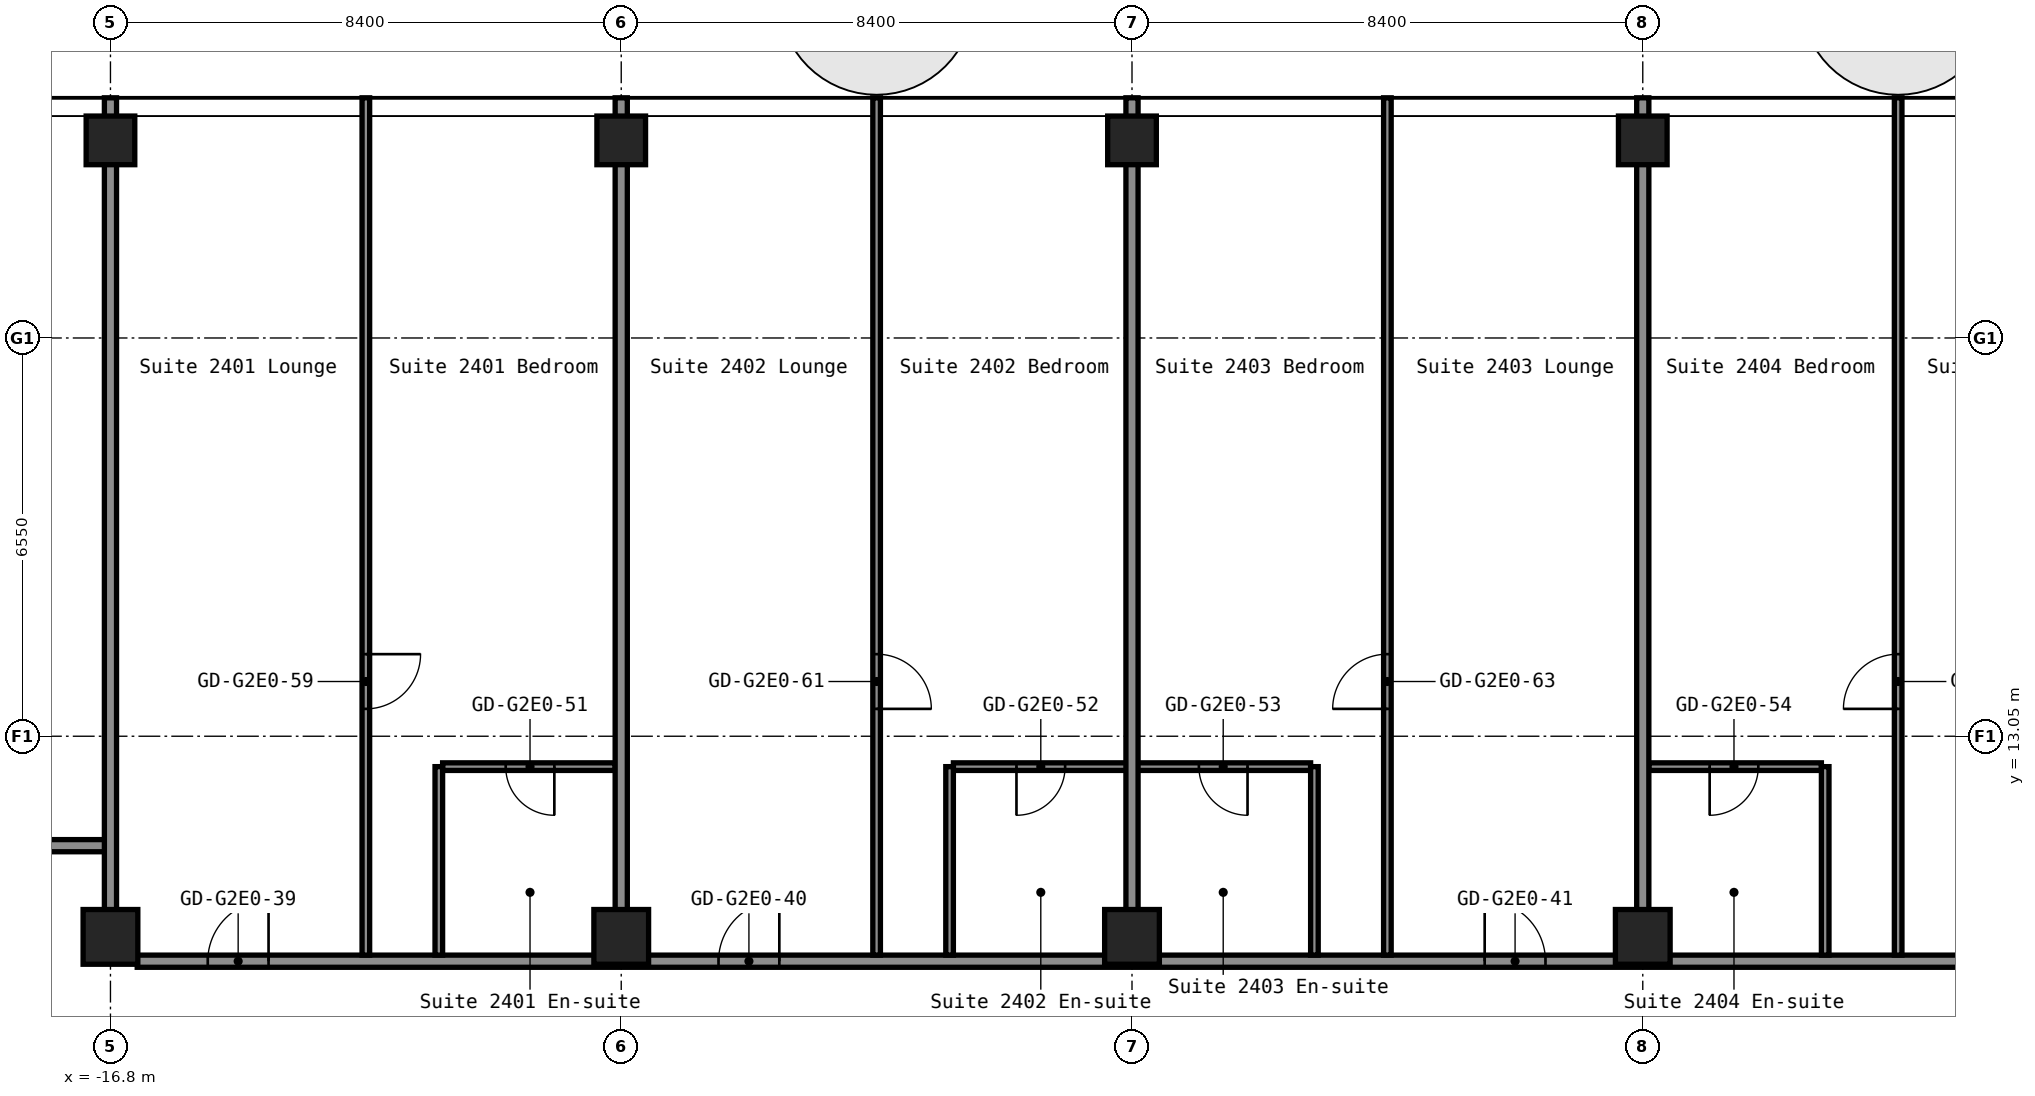
"""IFC4 building model, lengths in metres.
Left out: names, types, materials, properties, quantities, classifications, styles, units other than length and angle.
Written with IfcOpenShell. Run it as: python <this file> out.ifc"""

import sys

from ifc_helpers import new_model, si_unit, direction, frame, frame_2d, origin, origin_2d, place, context, subcontext, project, spatial, rectangle, hollow_rectangle, extrude, element, fill, save


model = new_model("IFC4")
c1 = context("Model", 3, precision=1e-05, world=origin(), true_north=direction((0.0, 1.0)))
c2 = subcontext(c1, "Body", "Model", "MODEL_VIEW")
j1 = project(units=[si_unit("LENGTHUNIT", "METRE"), si_unit("PLANEANGLEUNIT", "RADIAN")], contexts=[c1])
p1 = place(None, origin())
s1 = spatial("IfcSite", under=j1, at=p1, CompositionType="ELEMENT")
p2 = place(p1, origin())
s2 = spatial("IfcBuilding", under=s1, at=p2, CompositionType="ELEMENT")
p3 = place(p2, frame((0.0, 0.0, 88.2)))
s3 = spatial("IfcBuildingStorey", under=s2, at=p3, CompositionType="ELEMENT", Elevation=88.2)
p4 = place(p3, frame((-16.8, 9.75, 0.0), z_axis=(0.0, 0.0, 1.0), x_axis=(1.0, 0.0, 0.0)))
e1 = element("IfcColumn", 1, at=p4, inside=s3, PredefinedType="COLUMN", context=c2, shape_type="SweptSolid", body=[
    extrude(hollow_rectangle(XDim=0.9, YDim=0.9, WallThickness=0.036, at=origin_2d()), origin(), (0.0, 0.0, 1.0), 2.8),
])
p5 = place(p3, frame((-16.8, 22.85, 0.0), z_axis=(0.0, 0.0, 1.0), x_axis=(1.0, 0.0, 0.0)))
e2 = element("IfcColumn", 2, at=p5, inside=s3, PredefinedType="COLUMN", context=c2, shape_type="SweptSolid", body=[
    extrude(hollow_rectangle(XDim=0.8, YDim=0.8, WallThickness=0.032, at=origin_2d()), origin(), (0.0, 0.0, 1.0), 2.8),
])
p6 = place(p3, frame((-8.4, 9.75, 0.0), z_axis=(0.0, 0.0, 1.0), x_axis=(1.0, 0.0, 0.0)))
e3 = element("IfcColumn", 3, at=p6, inside=s3, PredefinedType="COLUMN", context=c2, shape_type="SweptSolid", body=[
    extrude(hollow_rectangle(XDim=0.9, YDim=0.9, WallThickness=0.036, at=origin_2d()), origin(), (0.0, 0.0, 1.0), 2.8),
])
p7 = place(p3, frame((-8.4, 22.85, 0.0), z_axis=(0.0, 0.0, 1.0), x_axis=(1.0, 0.0, 0.0)))
e4 = element("IfcColumn", 4, at=p7, inside=s3, PredefinedType="COLUMN", context=c2, shape_type="SweptSolid", body=[
    extrude(hollow_rectangle(XDim=0.8, YDim=0.8, WallThickness=0.032, at=origin_2d()), origin(), (0.0, 0.0, 1.0), 2.8),
])
p8 = place(p3, frame((0.0, 9.75, 0.0), z_axis=(0.0, 0.0, 1.0), x_axis=(1.0, 0.0, 0.0)))
e5 = element("IfcColumn", 5, at=p8, inside=s3, PredefinedType="COLUMN", context=c2, shape_type="SweptSolid", body=[
    extrude(hollow_rectangle(XDim=0.9, YDim=0.9, WallThickness=0.036, at=origin_2d()), origin(), (0.0, 0.0, 1.0), 2.8),
])
p9 = place(p3, frame((0.0, 22.85, 0.0), z_axis=(0.0, 0.0, 1.0), x_axis=(1.0, 0.0, 0.0)))
e6 = element("IfcColumn", 6, at=p9, inside=s3, PredefinedType="COLUMN", context=c2, shape_type="SweptSolid", body=[
    extrude(hollow_rectangle(XDim=0.8, YDim=0.8, WallThickness=0.032, at=origin_2d()), origin(), (0.0, 0.0, 1.0), 2.8),
])
p10 = place(p3, frame((8.4, 9.75, 0.0), z_axis=(0.0, 0.0, 1.0), x_axis=(1.0, 0.0, 0.0)))
e7 = element("IfcColumn", 7, at=p10, inside=s3, PredefinedType="COLUMN", context=c2, shape_type="SweptSolid", body=[
    extrude(hollow_rectangle(XDim=0.9, YDim=0.9, WallThickness=0.036, at=origin_2d()), origin(), (0.0, 0.0, 1.0), 2.8),
])
p11 = place(p3, frame((8.4, 22.85, 0.0), z_axis=(0.0, 0.0, 1.0), x_axis=(1.0, 0.0, 0.0)))
e8 = element("IfcColumn", 8, at=p11, inside=s3, PredefinedType="COLUMN", context=c2, shape_type="SweptSolid", body=[
    extrude(hollow_rectangle(XDim=0.8, YDim=0.8, WallThickness=0.032, at=origin_2d()), origin(), (0.0, 0.0, 1.0), 2.8),
])
p12 = place(p3, frame((-16.36, 9.35, 0.0), z_axis=(0.0, 0.0, 1.0), x_axis=(1.0, 0.0, 0.0)))
e9 = element("IfcWall", 9, at=p12, inside=s3, PredefinedType="PARTITIONING", context=c2, shape_type="SweptSolid", body=[
    extrude(rectangle(XDim=32.72, YDim=0.2, at=frame_2d((16.36, 0.0))), origin(), (0.0, 0.0, 1.0), 2.8),
])
p13 = place(p12, frame((1.16, 0.0, 0.0)))
e10 = element("IfcOpeningElement", 10, at=p13, cuts=e9, PredefinedType="OPENING", context=c2, shape_type="SweptSolid", body=[
    extrude(rectangle(XDim=1.0, YDim=2.1, at=frame_2d((0.5, 1.05))), frame((0.0, 0.11, 0.0), z_axis=(0.0, -1.0, 0.0), x_axis=(1.0, 0.0, 0.0)), (0.0, 0.0, 1.0), 0.22),
])
p14 = place(p12, frame((9.56, 0.0, 0.0)))
e11 = element("IfcOpeningElement", 11, at=p14, cuts=e9, PredefinedType="OPENING", context=c2, shape_type="SweptSolid", body=[
    extrude(rectangle(XDim=1.0, YDim=2.1, at=frame_2d((0.5, 1.05))), frame((0.0, 0.11, 0.0), z_axis=(0.0, -1.0, 0.0), x_axis=(1.0, 0.0, 0.0)), (0.0, 0.0, 1.0), 0.22),
])
p15 = place(p12, frame((22.16, 0.0, 0.0)))
e12 = element("IfcOpeningElement", 12, at=p15, cuts=e9, PredefinedType="OPENING", context=c2, shape_type="SweptSolid", body=[
    extrude(rectangle(XDim=1.0, YDim=2.1, at=frame_2d((0.5, 1.05))), frame((0.0, 0.11, 0.0), z_axis=(0.0, -1.0, 0.0), x_axis=(1.0, 0.0, 0.0)), (0.0, 0.0, 1.0), 0.22),
])
p16 = place(p12, frame((30.56, 0.0, 0.0)))
e13 = element("IfcOpeningElement", 13, at=p16, cuts=e9, PredefinedType="OPENING", context=c2, shape_type="SweptSolid", body=[
    extrude(rectangle(XDim=1.0, YDim=2.1, at=frame_2d((0.5, 1.05))), frame((0.0, 0.11, 0.0), z_axis=(0.0, -1.0, 0.0), x_axis=(1.0, 0.0, 0.0)), (0.0, 0.0, 1.0), 0.22),
])
p17 = place(p3, frame((-46.5, 11.25, 0.0), z_axis=(0.0, 0.0, 1.0), x_axis=(1.0, 0.0, 0.0)))
e14 = element("IfcWall", 14, at=p17, inside=s3, PredefinedType="PARTITIONING", context=c2, shape_type="SweptSolid", body=[
    extrude(rectangle(XDim=29.7, YDim=0.2, at=frame_2d((14.85, 0.0))), origin(), (0.0, 0.0, 1.0), 2.8),
])
p18 = place(p17, frame((1.95, 0.0, 0.0)))
e15 = element("IfcOpeningElement", 15, at=p18, cuts=e14, PredefinedType="OPENING", context=c2, shape_type="SweptSolid", body=[
    extrude(rectangle(XDim=0.9, YDim=2.1, at=frame_2d((0.45, 1.05))), frame((0.0, 0.11, 0.0), z_axis=(0.0, -1.0, 0.0), x_axis=(1.0, 0.0, 0.0)), (0.0, 0.0, 1.0), 0.22),
])
p19 = place(p17, frame((8.2, 0.0, 0.0)))
e16 = element("IfcOpeningElement", 16, at=p19, cuts=e14, PredefinedType="OPENING", context=c2, shape_type="SweptSolid", body=[
    extrude(rectangle(XDim=1.0, YDim=2.1, at=frame_2d((0.5, 1.05))), frame((0.0, 0.11, 0.0), z_axis=(0.0, -1.0, 0.0), x_axis=(1.0, 0.0, 0.0)), (0.0, 0.0, 1.0), 0.22),
])
p20 = place(p17, frame((16.6, 0.0, 0.0)))
e17 = element("IfcOpeningElement", 17, at=p20, cuts=e14, PredefinedType="OPENING", context=c2, shape_type="SweptSolid", body=[
    extrude(rectangle(XDim=1.0, YDim=2.1, at=frame_2d((0.5, 1.05))), frame((0.0, 0.11, 0.0), z_axis=(0.0, -1.0, 0.0), x_axis=(1.0, 0.0, 0.0)), (0.0, 0.0, 1.0), 0.22),
])
p21 = place(p17, frame((25.0, 0.0, 0.0)))
e18 = element("IfcOpeningElement", 18, at=p21, cuts=e14, PredefinedType="OPENING", context=c2, shape_type="SweptSolid", body=[
    extrude(rectangle(XDim=1.0, YDim=2.1, at=frame_2d((0.5, 1.05))), frame((0.0, 0.11, 0.0), z_axis=(0.0, -1.0, 0.0), x_axis=(1.0, 0.0, 0.0)), (0.0, 0.0, 1.0), 0.22),
])
p22 = place(p3, frame((-11.337, 12.55, 0.0), z_axis=(0.0, 0.0, 1.0), x_axis=(1.0, 0.0, 0.0)))
e19 = element("IfcWall", 19, at=p22, inside=s3, PredefinedType="PARTITIONING", context=c2, shape_type="SweptSolid", body=[
    extrude(rectangle(XDim=2.837, YDim=0.125, at=frame_2d((1.419, 0.0))), origin(), (0.0, 0.0, 1.0), 2.8),
])
p23 = place(p22, frame((1.038, 0.0, 0.0)))
e20 = element("IfcOpeningElement", 20, at=p23, cuts=e19, PredefinedType="OPENING", context=c2, shape_type="SweptSolid", body=[
    extrude(rectangle(XDim=0.8, YDim=2.1, at=frame_2d((0.4, 1.05))), frame((0.0, 0.073, 0.0), z_axis=(0.0, -1.0, 0.0), x_axis=(1.0, 0.0, 0.0)), (0.0, 0.0, 1.0), 0.145),
])
p24 = place(p3, frame((-2.938, 12.55, 0.0), z_axis=(0.0, 0.0, 1.0), x_axis=(1.0, 0.0, 0.0)))
e21 = element("IfcWall", 21, at=p24, inside=s3, PredefinedType="PARTITIONING", context=c2, shape_type="SweptSolid", body=[
    extrude(rectangle(XDim=5.875, YDim=0.125, at=frame_2d((2.938, 0.0))), origin(), (0.0, 0.0, 1.0), 2.8),
])
p25 = place(p24, frame((1.038, 0.0, 0.0)))
e22 = element("IfcOpeningElement", 22, at=p25, cuts=e21, PredefinedType="OPENING", context=c2, shape_type="SweptSolid", body=[
    extrude(rectangle(XDim=0.8, YDim=2.1, at=frame_2d((0.4, 1.05))), frame((0.0, 0.073, 0.0), z_axis=(0.0, -1.0, 0.0), x_axis=(1.0, 0.0, 0.0)), (0.0, 0.0, 1.0), 0.145),
])
p26 = place(p24, frame((4.038, 0.0, 0.0)))
e23 = element("IfcOpeningElement", 23, at=p26, cuts=e21, PredefinedType="OPENING", context=c2, shape_type="SweptSolid", body=[
    extrude(rectangle(XDim=0.8, YDim=2.1, at=frame_2d((0.4, 1.05))), frame((0.0, 0.073, 0.0), z_axis=(0.0, -1.0, 0.0), x_axis=(1.0, 0.0, 0.0)), (0.0, 0.0, 1.0), 0.145),
])
p27 = place(p3, frame((8.5, 12.55, 0.0), z_axis=(0.0, 0.0, 1.0), x_axis=(1.0, 0.0, 0.0)))
e24 = element("IfcWall", 24, at=p27, inside=s3, PredefinedType="PARTITIONING", context=c2, shape_type="SweptSolid", body=[
    extrude(rectangle(XDim=2.837, YDim=0.125, at=frame_2d((1.419, 0.0))), origin(), (0.0, 0.0, 1.0), 2.8),
])
p28 = place(p27, frame((1.0, 0.0, 0.0)))
e25 = element("IfcOpeningElement", 25, at=p28, cuts=e24, PredefinedType="OPENING", context=c2, shape_type="SweptSolid", body=[
    extrude(rectangle(XDim=0.8, YDim=2.1, at=frame_2d((0.4, 1.05))), frame((0.0, 0.073, 0.0), z_axis=(0.0, -1.0, 0.0), x_axis=(1.0, 0.0, 0.0)), (0.0, 0.0, 1.0), 0.145),
])
p29 = place(p3, frame((-16.8, 10.19, 0.0), z_axis=(0.0, 0.0, 1.0), x_axis=(0.0, 1.0, 0.0)))
e26 = element("IfcWall", 26, at=p29, inside=s3, PredefinedType="PARTITIONING", context=c2, shape_type="SweptSolid", body=[
    extrude(rectangle(XDim=13.36, YDim=0.2, at=frame_2d((6.68, 0.0))), origin(), (0.0, 0.0, 1.0), 2.8),
])
p30 = place(p3, frame((-12.6, 9.45, 0.0), z_axis=(0.0, 0.0, 1.0), x_axis=(0.0, 1.0, 0.0)))
e27 = element("IfcWall", 27, at=p30, inside=s3, PredefinedType="PARTITIONING", context=c2, shape_type="SweptSolid", body=[
    extrude(rectangle(XDim=14.1, YDim=0.125, at=frame_2d((7.05, 0.0))), origin(), (0.0, 0.0, 1.0), 2.8),
])
p31 = place(p30, frame((4.05, 0.0, 0.0)))
e28 = element("IfcOpeningElement", 28, at=p31, cuts=e27, PredefinedType="OPENING", context=c2, shape_type="SweptSolid", body=[
    extrude(rectangle(XDim=0.9, YDim=2.1, at=frame_2d((0.45, 1.05))), frame((0.0, 0.073, 0.0), z_axis=(0.0, -1.0, 0.0), x_axis=(1.0, 0.0, 0.0)), (0.0, 0.0, 1.0), 0.145),
])
p32 = place(p3, frame((-11.4, 9.45, 0.0), z_axis=(0.0, 0.0, 1.0), x_axis=(0.0, 1.0, 0.0)))
e29 = element("IfcWall", 29, at=p32, inside=s3, PredefinedType="PARTITIONING", context=c2, shape_type="SweptSolid", body=[
    extrude(rectangle(XDim=3.1, YDim=0.125, at=frame_2d((1.55, 0.0))), origin(), (0.0, 0.0, 1.0), 2.8),
])
p33 = place(p3, frame((-8.4, 10.19, 0.0), z_axis=(0.0, 0.0, 1.0), x_axis=(0.0, 1.0, 0.0)))
e30 = element("IfcWall", 30, at=p33, inside=s3, PredefinedType="PARTITIONING", context=c2, shape_type="SweptSolid", body=[
    extrude(rectangle(XDim=13.36, YDim=0.2, at=frame_2d((6.68, 0.0))), origin(), (0.0, 0.0, 1.0), 2.8),
])
p34 = place(p3, frame((-4.2, 9.45, 0.0), z_axis=(0.0, 0.0, 1.0), x_axis=(0.0, 1.0, 0.0)))
e31 = element("IfcWall", 31, at=p34, inside=s3, PredefinedType="PARTITIONING", context=c2, shape_type="SweptSolid", body=[
    extrude(rectangle(XDim=14.1, YDim=0.125, at=frame_2d((7.05, 0.0))), origin(), (0.0, 0.0, 1.0), 2.8),
])
p35 = place(p34, frame((4.05, 0.0, 0.0)))
e32 = element("IfcOpeningElement", 32, at=p35, cuts=e31, PredefinedType="OPENING", context=c2, shape_type="SweptSolid", body=[
    extrude(rectangle(XDim=0.9, YDim=2.1, at=frame_2d((0.45, 1.05))), frame((0.0, 0.073, 0.0), z_axis=(0.0, -1.0, 0.0), x_axis=(1.0, 0.0, 0.0)), (0.0, 0.0, 1.0), 0.145),
])
p36 = place(p3, frame((-3.0, 9.45, 0.0), z_axis=(0.0, 0.0, 1.0), x_axis=(0.0, 1.0, 0.0)))
e33 = element("IfcWall", 33, at=p36, inside=s3, PredefinedType="PARTITIONING", context=c2, shape_type="SweptSolid", body=[
    extrude(rectangle(XDim=3.1, YDim=0.125, at=frame_2d((1.55, 0.0))), origin(), (0.0, 0.0, 1.0), 2.8),
])
p37 = place(p3, frame((0.0, 10.19, 0.0), z_axis=(0.0, 0.0, 1.0), x_axis=(0.0, 1.0, 0.0)))
e34 = element("IfcWall", 34, at=p37, inside=s3, PredefinedType="PARTITIONING", context=c2, shape_type="SweptSolid", body=[
    extrude(rectangle(XDim=13.36, YDim=0.2, at=frame_2d((6.68, 0.0))), origin(), (0.0, 0.0, 1.0), 2.8),
])
p38 = place(p3, frame((3.0, 9.45, 0.0), z_axis=(0.0, 0.0, 1.0), x_axis=(0.0, 1.0, 0.0)))
e35 = element("IfcWall", 35, at=p38, inside=s3, PredefinedType="PARTITIONING", context=c2, shape_type="SweptSolid", body=[
    extrude(rectangle(XDim=3.1, YDim=0.125, at=frame_2d((1.55, 0.0))), origin(), (0.0, 0.0, 1.0), 2.8),
])
p39 = place(p3, frame((4.2, 9.45, 0.0), z_axis=(0.0, 0.0, 1.0), x_axis=(0.0, 1.0, 0.0)))
e36 = element("IfcWall", 36, at=p39, inside=s3, PredefinedType="PARTITIONING", context=c2, shape_type="SweptSolid", body=[
    extrude(rectangle(XDim=14.1, YDim=0.125, at=frame_2d((7.05, 0.0))), origin(), (0.0, 0.0, 1.0), 2.8),
])
p40 = place(p39, frame((4.05, 0.0, 0.0)))
e37 = element("IfcOpeningElement", 37, at=p40, cuts=e36, PredefinedType="OPENING", context=c2, shape_type="SweptSolid", body=[
    extrude(rectangle(XDim=0.9, YDim=2.1, at=frame_2d((0.45, 1.05))), frame((0.0, 0.073, 0.0), z_axis=(0.0, -1.0, 0.0), x_axis=(1.0, 0.0, 0.0)), (0.0, 0.0, 1.0), 0.145),
])
p41 = place(p3, frame((8.4, 10.19, 0.0), z_axis=(0.0, 0.0, 1.0), x_axis=(0.0, 1.0, 0.0)))
e38 = element("IfcWall", 38, at=p41, inside=s3, PredefinedType="PARTITIONING", context=c2, shape_type="SweptSolid", body=[
    extrude(rectangle(XDim=13.36, YDim=0.2, at=frame_2d((6.68, 0.0))), origin(), (0.0, 0.0, 1.0), 2.8),
])
p42 = place(p3, frame((11.4, 9.45, 0.0), z_axis=(0.0, 0.0, 1.0), x_axis=(0.0, 1.0, 0.0)))
e39 = element("IfcWall", 39, at=p42, inside=s3, PredefinedType="PARTITIONING", context=c2, shape_type="SweptSolid", body=[
    extrude(rectangle(XDim=3.1, YDim=0.125, at=frame_2d((1.55, 0.0))), origin(), (0.0, 0.0, 1.0), 2.8),
])
p43 = place(p3, frame((12.6, 9.45, 0.0), z_axis=(0.0, 0.0, 1.0), x_axis=(0.0, 1.0, 0.0)))
e40 = element("IfcWall", 40, at=p43, inside=s3, PredefinedType="PARTITIONING", context=c2, shape_type="SweptSolid", body=[
    extrude(rectangle(XDim=14.1, YDim=0.125, at=frame_2d((7.05, 0.0))), origin(), (0.0, 0.0, 1.0), 2.8),
])
p44 = place(p43, frame((4.05, 0.0, 0.0)))
e41 = element("IfcOpeningElement", 41, at=p44, cuts=e40, PredefinedType="OPENING", context=c2, shape_type="SweptSolid", body=[
    extrude(rectangle(XDim=0.9, YDim=2.1, at=frame_2d((0.45, 1.05))), frame((0.0, 0.073, 0.0), z_axis=(0.0, -1.0, 0.0), x_axis=(1.0, 0.0, 0.0)), (0.0, 0.0, 1.0), 0.145),
])
p45 = place(p13, origin())
e42 = element("IfcDoor", 42, at=p45, inside=s3, OperationType="SINGLE_SWING_LEFT", PredefinedType="DOOR", context=c2, shape_type="SweptSolid", body=[
    extrude(rectangle(XDim=1.0, YDim=2.1, at=frame_2d((0.5, 1.05))), frame((0.0, 0.025, 0.0), z_axis=(0.0, -1.0, 0.0), x_axis=(1.0, 0.0, 0.0)), (0.0, 0.0, 1.0), 0.05),
])
fill(e10, e42)
p46 = place(p14, origin())
e43 = element("IfcDoor", 43, at=p46, inside=s3, OperationType="SINGLE_SWING_LEFT", PredefinedType="DOOR", context=c2, shape_type="SweptSolid", body=[
    extrude(rectangle(XDim=1.0, YDim=2.1, at=frame_2d((0.5, 1.05))), frame((0.0, 0.025, 0.0), z_axis=(0.0, -1.0, 0.0), x_axis=(1.0, 0.0, 0.0)), (0.0, 0.0, 1.0), 0.05),
])
fill(e11, e43)
p47 = place(p15, origin())
e44 = element("IfcDoor", 44, at=p47, inside=s3, OperationType="SINGLE_SWING_RIGHT", PredefinedType="DOOR", context=c2, shape_type="SweptSolid", body=[
    extrude(rectangle(XDim=1.0, YDim=2.1, at=frame_2d((0.5, 1.05))), frame((0.0, 0.025, 0.0), z_axis=(0.0, -1.0, 0.0), x_axis=(1.0, 0.0, 0.0)), (0.0, 0.0, 1.0), 0.05),
])
fill(e12, e44)
p48 = place(p23, origin())
e45 = element("IfcDoor", 45, at=p48, inside=s3, OperationType="SINGLE_SWING_RIGHT", PredefinedType="DOOR", context=c2, shape_type="SweptSolid", body=[
    extrude(rectangle(XDim=0.8, YDim=2.1, at=frame_2d((0.4, 1.05))), frame((0.0, 0.025, 0.0), z_axis=(0.0, -1.0, 0.0), x_axis=(1.0, 0.0, 0.0)), (0.0, 0.0, 1.0), 0.05),
])
fill(e20, e45)
p49 = place(p25, origin())
e46 = element("IfcDoor", 46, at=p49, inside=s3, OperationType="SINGLE_SWING_LEFT", PredefinedType="DOOR", context=c2, shape_type="SweptSolid", body=[
    extrude(rectangle(XDim=0.8, YDim=2.1, at=frame_2d((0.4, 1.05))), frame((0.0, 0.025, 0.0), z_axis=(0.0, -1.0, 0.0), x_axis=(1.0, 0.0, 0.0)), (0.0, 0.0, 1.0), 0.05),
])
fill(e22, e46)
p50 = place(p26, origin())
e47 = element("IfcDoor", 47, at=p50, inside=s3, OperationType="SINGLE_SWING_RIGHT", PredefinedType="DOOR", context=c2, shape_type="SweptSolid", body=[
    extrude(rectangle(XDim=0.8, YDim=2.1, at=frame_2d((0.4, 1.05))), frame((0.0, 0.025, 0.0), z_axis=(0.0, -1.0, 0.0), x_axis=(1.0, 0.0, 0.0)), (0.0, 0.0, 1.0), 0.05),
])
fill(e23, e47)
p51 = place(p28, origin())
e48 = element("IfcDoor", 48, at=p51, inside=s3, OperationType="SINGLE_SWING_LEFT", PredefinedType="DOOR", context=c2, shape_type="SweptSolid", body=[
    extrude(rectangle(XDim=0.8, YDim=2.1, at=frame_2d((0.4, 1.05))), frame((0.0, 0.025, 0.0), z_axis=(0.0, -1.0, 0.0), x_axis=(1.0, 0.0, 0.0)), (0.0, 0.0, 1.0), 0.05),
])
fill(e25, e48)
p52 = place(p31, origin())
e49 = element("IfcDoor", 49, at=p52, inside=s3, OperationType="SINGLE_SWING_RIGHT", PredefinedType="DOOR", context=c2, shape_type="SweptSolid", body=[
    extrude(rectangle(XDim=0.9, YDim=2.1, at=frame_2d((0.45, 1.05))), frame((0.0, 0.025, 0.0), z_axis=(0.0, -1.0, 0.0), x_axis=(1.0, 0.0, 0.0)), (0.0, 0.0, 1.0), 0.05),
])
fill(e28, e49)
p53 = place(p35, origin())
e50 = element("IfcDoor", 50, at=p53, inside=s3, OperationType="SINGLE_SWING_LEFT", PredefinedType="DOOR", context=c2, shape_type="SweptSolid", body=[
    extrude(rectangle(XDim=0.9, YDim=2.1, at=frame_2d((0.45, 1.05))), frame((0.0, 0.025, 0.0), z_axis=(0.0, -1.0, 0.0), x_axis=(1.0, 0.0, 0.0)), (0.0, 0.0, 1.0), 0.05),
])
fill(e32, e50)
p54 = place(p40, origin())
e51 = element("IfcDoor", 51, at=p54, inside=s3, OperationType="SINGLE_SWING_RIGHT", PredefinedType="DOOR", context=c2, shape_type="SweptSolid", body=[
    extrude(rectangle(XDim=0.9, YDim=2.1, at=frame_2d((0.45, 1.05))), frame((0.0, 0.025, 0.0), z_axis=(0.0, -1.0, 0.0), x_axis=(1.0, 0.0, 0.0)), (0.0, 0.0, 1.0), 0.05),
])
fill(e37, e51)
p55 = place(p44, origin())
e52 = element("IfcDoor", 52, at=p55, inside=s3, OperationType="SINGLE_SWING_RIGHT", PredefinedType="DOOR", context=c2, shape_type="SweptSolid", body=[
    extrude(rectangle(XDim=0.9, YDim=2.1, at=frame_2d((0.45, 1.05))), frame((0.0, 0.025, 0.0), z_axis=(0.0, -1.0, 0.0), x_axis=(1.0, 0.0, 0.0)), (0.0, 0.0, 1.0), 0.05),
])
fill(e41, e52)
save(model, sys.argv[1])
